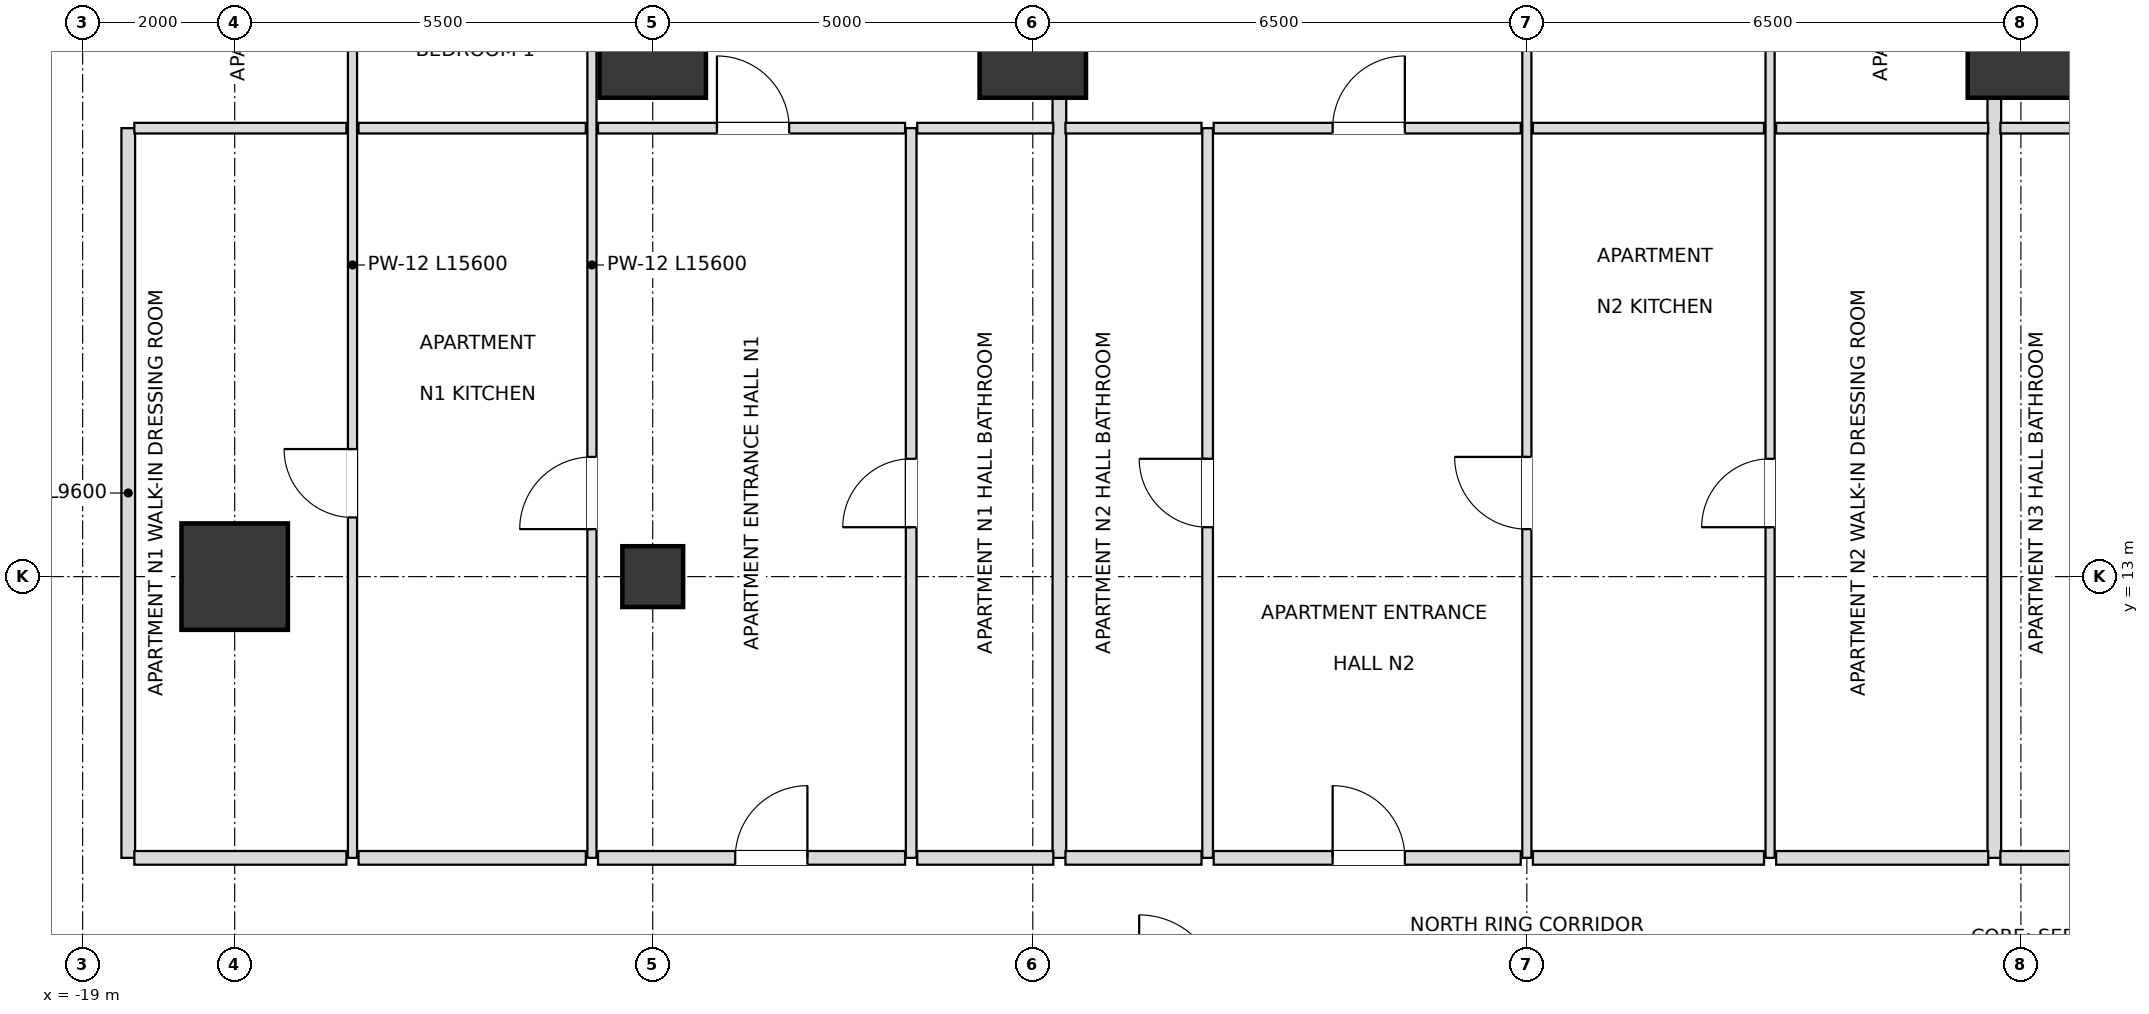
"""IFC4 building model, lengths in metres.
Left out: names, types, materials, properties, quantities, classifications, styles, units other than length and angle.
Written with IfcOpenShell. Run it as: python <this file> out.ifc"""

import sys

from ifc_helpers import new_model, si_unit, direction, frame, frame_2d, origin, origin_2d, place, context, subcontext, project, spatial, rectangle, extrude, element, fill, save


model = new_model("IFC4")
c1 = context("Model", 3, precision=1e-05, world=origin(), true_north=direction((0.0, 1.0)))
c2 = subcontext(c1, "Body", "Model", "MODEL_VIEW")
j1 = project(units=[si_unit("LENGTHUNIT", "METRE"), si_unit("PLANEANGLEUNIT", "RADIAN")], contexts=[c1])
p1 = place(None, origin())
s1 = spatial("IfcSite", under=j1, at=p1, CompositionType="ELEMENT")
p2 = place(p1, origin())
s2 = spatial("IfcBuilding", under=s1, at=p2, CompositionType="ELEMENT")
p3 = place(p2, frame((0.0, 0.0, 43.2)))
s3 = spatial("IfcBuildingStorey", under=s2, at=p3, CompositionType="ELEMENT", Elevation=43.2)
for number, where, z_axis, x_axis in (
    (1, (6.5, 20.0, 0.0), (0.0, 0.0, 1.0), (1.0, 0.0, 0.0)),
    (2, (-6.5, 20.0, 0.0), (0.0, 0.0, 1.0), (1.0, 0.0, 0.0)),
    (3, (-11.5, 20.0, 0.0), (0.0, 0.0, 1.0), (1.0, 0.0, 0.0)),
    (4, (-17.0, 13.0, 0.0), (0.0, 0.0, 1.0), (1.0, 0.0, 0.0)),
):
    element("IfcColumn", number, at=place(p3, frame(where, z_axis=z_axis, x_axis=x_axis)), inside=s3, PredefinedType="USERDEFINED", context=c2, shape_type="SweptSolid", body=[
        extrude(rectangle(XDim=1.4, YDim=1.4, at=origin_2d()), origin(), (0.0, 0.0, 1.0), 3.6),
    ])
p4 = place(p3, frame((-11.5, 13.0, 0.0), z_axis=(0.0, 0.0, 1.0), x_axis=(1.0, 0.0, 0.0)))
e5 = element("IfcColumn", 5, at=p4, inside=s3, PredefinedType="COLUMN", context=c2, shape_type="SweptSolid", body=[
    extrude(rectangle(XDim=0.8, YDim=0.8, at=origin_2d()), origin(), (0.0, 0.0, 1.0), 3.6),
])
p5 = place(p3, frame((-18.4, 9.3, 0.0), z_axis=(0.0, 0.0, 1.0), x_axis=(0.0, 1.0, 0.0)))
e6 = element("IfcWall", 6, at=p5, inside=s3, PredefinedType="PARTITIONING", context=c2, shape_type="SweptSolid", body=[
    extrude(rectangle(XDim=9.6, YDim=0.18, at=frame_2d((4.8, 0.0))), origin(), (0.0, 0.0, 1.0), 2.736),
])
p6 = place(p3, frame((-15.45, 9.3, 0.0), z_axis=(0.0, 0.0, 1.0), x_axis=(0.0, 1.0, 0.0)))
e7 = element("IfcWall", 7, at=p6, inside=s3, PredefinedType="PARTITIONING", context=c2, shape_type="SweptSolid", body=[
    extrude(rectangle(XDim=15.6, YDim=0.12, at=frame_2d((7.8, 0.0))), origin(), (0.0, 0.0, 1.0), 2.736),
])
p7 = place(p6, frame((4.478, 0.0, 0.0)))
e8 = element("IfcOpeningElement", 8, at=p7, cuts=e7, PredefinedType="OPENING", context=c2, shape_type="SweptSolid", body=[
    extrude(rectangle(XDim=0.9, YDim=2.1, at=frame_2d((0.45, 1.05))), frame((0.0, 0.07, 0.0), z_axis=(0.0, -1.0, 0.0), x_axis=(1.0, 0.0, 0.0)), (0.0, 0.0, 1.0), 0.14),
])
p8 = place(p6, frame((12.15, 0.0, 0.0)))
e9 = element("IfcOpeningElement", 9, at=p8, cuts=e7, PredefinedType="OPENING", context=c2, shape_type="SweptSolid", body=[
    extrude(rectangle(XDim=0.9, YDim=2.1, at=frame_2d((0.45, 1.05))), frame((0.0, 0.07, 0.0), z_axis=(0.0, -1.0, 0.0), x_axis=(1.0, 0.0, 0.0)), (0.0, 0.0, 1.0), 0.14),
])
p9 = place(p3, frame((-12.3, 9.3, 0.0), z_axis=(0.0, 0.0, 1.0), x_axis=(0.0, 1.0, 0.0)))
e10 = element("IfcWall", 10, at=p9, inside=s3, PredefinedType="PARTITIONING", context=c2, shape_type="SweptSolid", body=[
    extrude(rectangle(XDim=15.6, YDim=0.12, at=frame_2d((7.8, 0.0))), origin(), (0.0, 0.0, 1.0), 2.736),
])
p10 = place(p9, frame((4.325, 0.0, 0.0)))
e11 = element("IfcOpeningElement", 11, at=p10, cuts=e10, PredefinedType="OPENING", context=c2, shape_type="SweptSolid", body=[
    extrude(rectangle(XDim=0.95, YDim=2.1, at=frame_2d((0.475, 1.05))), frame((0.0, 0.07, 0.0), z_axis=(0.0, -1.0, 0.0), x_axis=(1.0, 0.0, 0.0)), (0.0, 0.0, 1.0), 0.14),
])
p11 = place(p9, frame((12.15, 0.0, 0.0)))
e12 = element("IfcOpeningElement", 12, at=p11, cuts=e10, PredefinedType="OPENING", context=c2, shape_type="SweptSolid", body=[
    extrude(rectangle(XDim=0.9, YDim=2.1, at=frame_2d((0.45, 1.05))), frame((0.0, 0.07, 0.0), z_axis=(0.0, -1.0, 0.0), x_axis=(1.0, 0.0, 0.0)), (0.0, 0.0, 1.0), 0.14),
])
p12 = place(p3, frame((-8.1, 9.3, 0.0), z_axis=(0.0, 0.0, 1.0), x_axis=(0.0, 1.0, 0.0)))
e13 = element("IfcWall", 13, at=p12, inside=s3, PredefinedType="PARTITIONING", context=c2, shape_type="SweptSolid", body=[
    extrude(rectangle(XDim=9.6, YDim=0.14, at=frame_2d((4.8, 0.0))), origin(), (0.0, 0.0, 1.0), 2.816),
])
p13 = place(p12, frame((4.35, 0.0, 0.0)))
e14 = element("IfcOpeningElement", 14, at=p13, cuts=e13, PredefinedType="OPENING", context=c2, shape_type="SweptSolid", body=[
    extrude(rectangle(XDim=0.9, YDim=2.1, at=frame_2d((0.45, 1.05))), frame((0.0, 0.08, 0.0), z_axis=(0.0, -1.0, 0.0), x_axis=(1.0, 0.0, 0.0)), (0.0, 0.0, 1.0), 0.16),
])
p14 = place(p3, frame((-6.15, 9.3, 0.0), z_axis=(0.0, 0.0, 1.0), x_axis=(0.0, 1.0, 0.0)))
e15 = element("IfcWall", 15, at=p14, inside=s3, PredefinedType="PARTITIONING", context=c2, shape_type="SweptSolid", body=[
    extrude(rectangle(XDim=15.6, YDim=0.18, at=frame_2d((7.8, 0.0))), origin(), (0.0, 0.0, 1.0), 2.816),
])
p15 = place(p3, frame((-4.2, 9.3, 0.0), z_axis=(0.0, 0.0, 1.0), x_axis=(0.0, 1.0, 0.0)))
e16 = element("IfcWall", 16, at=p15, inside=s3, PredefinedType="PARTITIONING", context=c2, shape_type="SweptSolid", body=[
    extrude(rectangle(XDim=9.6, YDim=0.14, at=frame_2d((4.8, 0.0))), origin(), (0.0, 0.0, 1.0), 2.948),
])
p16 = place(p15, frame((4.35, 0.0, 0.0)))
e17 = element("IfcOpeningElement", 17, at=p16, cuts=e16, PredefinedType="OPENING", context=c2, shape_type="SweptSolid", body=[
    extrude(rectangle(XDim=0.9, YDim=2.1, at=frame_2d((0.45, 1.05))), frame((0.0, 0.08, 0.0), z_axis=(0.0, -1.0, 0.0), x_axis=(1.0, 0.0, 0.0)), (0.0, 0.0, 1.0), 0.16),
])
p17 = place(p3, frame((0.0, 9.3, 0.0), z_axis=(0.0, 0.0, 1.0), x_axis=(0.0, 1.0, 0.0)))
e18 = element("IfcWall", 18, at=p17, inside=s3, PredefinedType="PARTITIONING", context=c2, shape_type="SweptSolid", body=[
    extrude(rectangle(XDim=15.6, YDim=0.12, at=frame_2d((7.8, 0.0))), origin(), (0.0, 0.0, 1.0), 2.816),
])
p18 = place(p17, frame((4.325, 0.0, 0.0)))
e19 = element("IfcOpeningElement", 19, at=p18, cuts=e18, PredefinedType="OPENING", context=c2, shape_type="SweptSolid", body=[
    extrude(rectangle(XDim=0.95, YDim=2.1, at=frame_2d((0.475, 1.05))), frame((0.0, 0.07, 0.0), z_axis=(0.0, -1.0, 0.0), x_axis=(1.0, 0.0, 0.0)), (0.0, 0.0, 1.0), 0.14),
])
p19 = place(p17, frame((12.15, 0.0, 0.0)))
e20 = element("IfcOpeningElement", 20, at=p19, cuts=e18, PredefinedType="OPENING", context=c2, shape_type="SweptSolid", body=[
    extrude(rectangle(XDim=0.9, YDim=2.1, at=frame_2d((0.45, 1.05))), frame((0.0, 0.07, 0.0), z_axis=(0.0, -1.0, 0.0), x_axis=(1.0, 0.0, 0.0)), (0.0, 0.0, 1.0), 0.14),
])
p20 = place(p3, frame((3.2, 9.3, 0.0), z_axis=(0.0, 0.0, 1.0), x_axis=(0.0, 1.0, 0.0)))
e21 = element("IfcWall", 21, at=p20, inside=s3, PredefinedType="PARTITIONING", context=c2, shape_type="SweptSolid", body=[
    extrude(rectangle(XDim=15.6, YDim=0.12, at=frame_2d((7.8, 0.0))), origin(), (0.0, 0.0, 1.0), 2.816),
])
p21 = place(p20, frame((4.35, 0.0, 0.0)))
e22 = element("IfcOpeningElement", 22, at=p21, cuts=e21, PredefinedType="OPENING", context=c2, shape_type="SweptSolid", body=[
    extrude(rectangle(XDim=0.9, YDim=2.1, at=frame_2d((0.45, 1.05))), frame((0.0, 0.07, 0.0), z_axis=(0.0, -1.0, 0.0), x_axis=(1.0, 0.0, 0.0)), (0.0, 0.0, 1.0), 0.14),
])
p22 = place(p20, frame((12.15, 0.0, 0.0)))
e23 = element("IfcOpeningElement", 23, at=p22, cuts=e21, PredefinedType="OPENING", context=c2, shape_type="SweptSolid", body=[
    extrude(rectangle(XDim=0.9, YDim=2.1, at=frame_2d((0.45, 1.05))), frame((0.0, 0.07, 0.0), z_axis=(0.0, -1.0, 0.0), x_axis=(1.0, 0.0, 0.0)), (0.0, 0.0, 1.0), 0.14),
])
p23 = place(p3, frame((6.15, 9.3, 0.0), z_axis=(0.0, 0.0, 1.0), x_axis=(0.0, 1.0, 0.0)))
e24 = element("IfcWall", 24, at=p23, inside=s3, PredefinedType="PARTITIONING", context=c2, shape_type="SweptSolid", body=[
    extrude(rectangle(XDim=15.6, YDim=0.18, at=frame_2d((7.8, 0.0))), origin(), (0.0, 0.0, 1.0), 2.816),
])
p24 = place(p3, frame((-18.32, 9.3, 0.0), z_axis=(0.0, 0.0, 1.0), x_axis=(1.0, 0.0, 0.0)))
e25 = element("IfcWall", 25, at=p24, inside=s3, PredefinedType="PARTITIONING", context=c2, shape_type="SweptSolid", body=[
    extrude(rectangle(XDim=2.79, YDim=0.18, at=frame_2d((1.395, 0.0))), origin(), (0.0, 0.0, 1.0), 2.816),
])
p25 = place(p3, frame((-15.37, 9.3, 0.0), z_axis=(0.0, 0.0, 1.0), x_axis=(1.0, 0.0, 0.0)))
e26 = element("IfcWall", 26, at=p25, inside=s3, PredefinedType="PARTITIONING", context=c2, shape_type="SweptSolid", body=[
    extrude(rectangle(XDim=2.99, YDim=0.18, at=frame_2d((1.495, 0.0))), origin(), (0.0, 0.0, 1.0), 3.38),
])
p26 = place(p3, frame((-12.22, 9.3, 0.0), z_axis=(0.0, 0.0, 1.0), x_axis=(1.0, 0.0, 0.0)))
e27 = element("IfcWall", 27, at=p26, inside=s3, PredefinedType="PARTITIONING", context=c2, shape_type="SweptSolid", body=[
    extrude(rectangle(XDim=4.04, YDim=0.18, at=frame_2d((2.02, 0.0))), origin(), (0.0, 0.0, 1.0), 3.38),
])
p27 = place(p26, frame((1.805, 0.0, 0.0)))
e28 = element("IfcOpeningElement", 28, at=p27, cuts=e27, PredefinedType="OPENING", context=c2, shape_type="SweptSolid", body=[
    extrude(rectangle(XDim=0.95, YDim=2.15, at=frame_2d((0.475, 1.075))), frame((0.0, 0.1, 0.0), z_axis=(0.0, -1.0, 0.0), x_axis=(1.0, 0.0, 0.0)), (0.0, 0.0, 1.0), 0.2),
])
p28 = place(p3, frame((-8.02, 9.3, 0.0), z_axis=(0.0, 0.0, 1.0), x_axis=(1.0, 0.0, 0.0)))
e29 = element("IfcWall", 29, at=p28, inside=s3, PredefinedType="PARTITIONING", context=c2, shape_type="SweptSolid", body=[
    extrude(rectangle(XDim=1.79, YDim=0.18, at=frame_2d((0.895, 0.0))), origin(), (0.0, 0.0, 1.0), 2.816),
])
p29 = place(p3, frame((-6.07, 9.3, 0.0), z_axis=(0.0, 0.0, 1.0), x_axis=(1.0, 0.0, 0.0)))
e30 = element("IfcWall", 30, at=p29, inside=s3, PredefinedType="PARTITIONING", context=c2, shape_type="SweptSolid", body=[
    extrude(rectangle(XDim=1.79, YDim=0.18, at=frame_2d((0.895, 0.0))), origin(), (0.0, 0.0, 1.0), 3.38),
])
p30 = place(p3, frame((-4.12, 9.3, 0.0), z_axis=(0.0, 0.0, 1.0), x_axis=(1.0, 0.0, 0.0)))
e31 = element("IfcWall", 31, at=p30, inside=s3, PredefinedType="PARTITIONING", context=c2, shape_type="SweptSolid", body=[
    extrude(rectangle(XDim=4.04, YDim=0.18, at=frame_2d((2.02, 0.0))), origin(), (0.0, 0.0, 1.0), 3.38),
])
p31 = place(p30, frame((1.565, 0.0, 0.0)))
e32 = element("IfcOpeningElement", 32, at=p31, cuts=e31, PredefinedType="OPENING", context=c2, shape_type="SweptSolid", body=[
    extrude(rectangle(XDim=0.95, YDim=2.15, at=frame_2d((0.475, 1.075))), frame((0.0, 0.1, 0.0), z_axis=(0.0, -1.0, 0.0), x_axis=(1.0, 0.0, 0.0)), (0.0, 0.0, 1.0), 0.2),
])
p32 = place(p3, frame((0.08, 9.3, 0.0), z_axis=(0.0, 0.0, 1.0), x_axis=(1.0, 0.0, 0.0)))
e33 = element("IfcWall", 33, at=p32, inside=s3, PredefinedType="PARTITIONING", context=c2, shape_type="SweptSolid", body=[
    extrude(rectangle(XDim=3.04, YDim=0.18, at=frame_2d((1.52, 0.0))), origin(), (0.0, 0.0, 1.0), 3.38),
])
p33 = place(p3, frame((3.28, 9.3, 0.0), z_axis=(0.0, 0.0, 1.0), x_axis=(1.0, 0.0, 0.0)))
e34 = element("IfcWall", 34, at=p33, inside=s3, PredefinedType="PARTITIONING", context=c2, shape_type="SweptSolid", body=[
    extrude(rectangle(XDim=2.79, YDim=0.18, at=frame_2d((1.395, 0.0))), origin(), (0.0, 0.0, 1.0), 3.38),
])
p34 = place(p3, frame((6.23, 9.3, 0.0), z_axis=(0.0, 0.0, 1.0), x_axis=(1.0, 0.0, 0.0)))
e35 = element("IfcWall", 35, at=p34, inside=s3, PredefinedType="PARTITIONING", context=c2, shape_type="SweptSolid", body=[
    extrude(rectangle(XDim=1.79, YDim=0.18, at=frame_2d((0.895, 0.0))), origin(), (0.0, 0.0, 1.0), 2.816),
])
p35 = place(p3, frame((-18.32, 18.9, 0.0), z_axis=(0.0, 0.0, 1.0), x_axis=(1.0, 0.0, 0.0)))
e36 = element("IfcWall", 36, at=p35, inside=s3, PredefinedType="PARTITIONING", context=c2, shape_type="SweptSolid", body=[
    extrude(rectangle(XDim=2.79, YDim=0.14, at=frame_2d((1.395, 0.0))), origin(), (0.0, 0.0, 1.0), 2.736),
])
p36 = place(p3, frame((-15.37, 18.9, 0.0), z_axis=(0.0, 0.0, 1.0), x_axis=(1.0, 0.0, 0.0)))
e37 = element("IfcWall", 37, at=p36, inside=s3, PredefinedType="PARTITIONING", context=c2, shape_type="SweptSolid", body=[
    extrude(rectangle(XDim=2.99, YDim=0.14, at=frame_2d((1.495, 0.0))), origin(), (0.0, 0.0, 1.0), 2.736),
])
p37 = place(p3, frame((-12.22, 18.9, 0.0), z_axis=(0.0, 0.0, 1.0), x_axis=(1.0, 0.0, 0.0)))
e38 = element("IfcWall", 38, at=p37, inside=s3, PredefinedType="PARTITIONING", context=c2, shape_type="SweptSolid", body=[
    extrude(rectangle(XDim=4.04, YDim=0.14, at=frame_2d((2.02, 0.0))), origin(), (0.0, 0.0, 1.0), 2.736),
])
p38 = place(p37, frame((1.565, 0.0, 0.0)))
e39 = element("IfcOpeningElement", 39, at=p38, cuts=e38, PredefinedType="OPENING", context=c2, shape_type="SweptSolid", body=[
    extrude(rectangle(XDim=0.95, YDim=2.1, at=frame_2d((0.475, 1.05))), frame((0.0, 0.08, 0.0), z_axis=(0.0, -1.0, 0.0), x_axis=(1.0, 0.0, 0.0)), (0.0, 0.0, 1.0), 0.16),
])
p39 = place(p3, frame((-8.02, 18.9, 0.0), z_axis=(0.0, 0.0, 1.0), x_axis=(1.0, 0.0, 0.0)))
e40 = element("IfcWall", 40, at=p39, inside=s3, PredefinedType="PARTITIONING", context=c2, shape_type="SweptSolid", body=[
    extrude(rectangle(XDim=1.79, YDim=0.14, at=frame_2d((0.895, 0.0))), origin(), (0.0, 0.0, 1.0), 2.816),
])
p40 = place(p3, frame((-6.07, 18.9, 0.0), z_axis=(0.0, 0.0, 1.0), x_axis=(1.0, 0.0, 0.0)))
e41 = element("IfcWall", 41, at=p40, inside=s3, PredefinedType="PARTITIONING", context=c2, shape_type="SweptSolid", body=[
    extrude(rectangle(XDim=1.79, YDim=0.14, at=frame_2d((0.895, 0.0))), origin(), (0.0, 0.0, 1.0), 3.38),
])
p41 = place(p3, frame((-4.12, 18.9, 0.0), z_axis=(0.0, 0.0, 1.0), x_axis=(1.0, 0.0, 0.0)))
e42 = element("IfcWall", 42, at=p41, inside=s3, PredefinedType="PARTITIONING", context=c2, shape_type="SweptSolid", body=[
    extrude(rectangle(XDim=4.04, YDim=0.14, at=frame_2d((2.02, 0.0))), origin(), (0.0, 0.0, 1.0), 3.38),
])
p42 = place(p41, frame((1.565, 0.0, 0.0)))
e43 = element("IfcOpeningElement", 43, at=p42, cuts=e42, PredefinedType="OPENING", context=c2, shape_type="SweptSolid", body=[
    extrude(rectangle(XDim=0.95, YDim=2.1, at=frame_2d((0.475, 1.05))), frame((0.0, 0.08, 0.0), z_axis=(0.0, -1.0, 0.0), x_axis=(1.0, 0.0, 0.0)), (0.0, 0.0, 1.0), 0.16),
])
p43 = place(p3, frame((0.08, 18.9, 0.0), z_axis=(0.0, 0.0, 1.0), x_axis=(1.0, 0.0, 0.0)))
e44 = element("IfcWall", 44, at=p43, inside=s3, PredefinedType="PARTITIONING", context=c2, shape_type="SweptSolid", body=[
    extrude(rectangle(XDim=3.04, YDim=0.14, at=frame_2d((1.52, 0.0))), origin(), (0.0, 0.0, 1.0), 3.38),
])
p44 = place(p3, frame((3.28, 18.9, 0.0), z_axis=(0.0, 0.0, 1.0), x_axis=(1.0, 0.0, 0.0)))
e45 = element("IfcWall", 45, at=p44, inside=s3, PredefinedType="PARTITIONING", context=c2, shape_type="SweptSolid", body=[
    extrude(rectangle(XDim=2.79, YDim=0.14, at=frame_2d((1.395, 0.0))), origin(), (0.0, 0.0, 1.0), 3.38),
])
p45 = place(p3, frame((6.23, 18.9, 0.0), z_axis=(0.0, 0.0, 1.0), x_axis=(1.0, 0.0, 0.0)))
e46 = element("IfcWall", 46, at=p45, inside=s3, PredefinedType="PARTITIONING", context=c2, shape_type="SweptSolid", body=[
    extrude(rectangle(XDim=1.79, YDim=0.14, at=frame_2d((0.895, 0.0))), origin(), (0.0, 0.0, 1.0), 2.816),
])
p46 = place(p13, origin())
e47 = element("IfcDoor", 47, at=p46, inside=s3, OperationType="SINGLE_SWING_LEFT", PredefinedType="DOOR", context=c2, shape_type="SweptSolid", body=[
    extrude(rectangle(XDim=0.9, YDim=2.1, at=frame_2d((0.45, 1.05))), frame((0.0, 0.025, 0.0), z_axis=(0.0, -1.0, 0.0), x_axis=(1.0, 0.0, 0.0)), (0.0, 0.0, 1.0), 0.05),
])
fill(e14, e47)
p47 = place(p27, origin())
e48 = element("IfcDoor", 48, at=p47, inside=s3, OperationType="SINGLE_SWING_RIGHT", PredefinedType="DOOR", context=c2, shape_type="SweptSolid", body=[
    extrude(rectangle(XDim=0.95, YDim=2.15, at=frame_2d((0.475, 1.075))), frame((0.0, 0.025, 0.0), z_axis=(0.0, -1.0, 0.0), x_axis=(1.0, 0.0, 0.0)), (0.0, 0.0, 1.0), 0.05),
])
fill(e28, e48)
p48 = place(p10, origin())
e49 = element("IfcDoor", 49, at=p48, inside=s3, OperationType="SINGLE_SWING_LEFT", PredefinedType="DOOR", context=c2, shape_type="SweptSolid", body=[
    extrude(rectangle(XDim=0.95, YDim=2.1, at=frame_2d((0.475, 1.05))), frame((0.0, 0.025, 0.0), z_axis=(0.0, -1.0, 0.0), x_axis=(1.0, 0.0, 0.0)), (0.0, 0.0, 1.0), 0.05),
])
fill(e11, e49)
p49 = place(p7, origin())
e50 = element("IfcDoor", 50, at=p49, inside=s3, OperationType="SINGLE_SWING_RIGHT", PredefinedType="DOOR", context=c2, shape_type="SweptSolid", body=[
    extrude(rectangle(XDim=0.9, YDim=2.1, at=frame_2d((0.45, 1.05))), frame((0.0, 0.025, 0.0), z_axis=(0.0, -1.0, 0.0), x_axis=(1.0, 0.0, 0.0)), (0.0, 0.0, 1.0), 0.05),
])
fill(e8, e50)
p50 = place(p38, origin())
e51 = element("IfcDoor", 51, at=p50, inside=s3, OperationType="SINGLE_SWING_LEFT", PredefinedType="DOOR", context=c2, shape_type="SweptSolid", body=[
    extrude(rectangle(XDim=0.95, YDim=2.1, at=frame_2d((0.475, 1.05))), frame((0.0, 0.025, 0.0), z_axis=(0.0, -1.0, 0.0), x_axis=(1.0, 0.0, 0.0)), (0.0, 0.0, 1.0), 0.05),
])
fill(e39, e51)
p51 = place(p16, origin())
e52 = element("IfcDoor", 52, at=p51, inside=s3, OperationType="SINGLE_SWING_RIGHT", PredefinedType="DOOR", context=c2, shape_type="SweptSolid", body=[
    extrude(rectangle(XDim=0.9, YDim=2.1, at=frame_2d((0.45, 1.05))), frame((0.0, 0.025, 0.0), z_axis=(0.0, -1.0, 0.0), x_axis=(1.0, 0.0, 0.0)), (0.0, 0.0, 1.0), 0.05),
])
fill(e17, e52)
p52 = place(p31, origin())
e53 = element("IfcDoor", 53, at=p52, inside=s3, OperationType="SINGLE_SWING_LEFT", PredefinedType="DOOR", context=c2, shape_type="SweptSolid", body=[
    extrude(rectangle(XDim=0.95, YDim=2.15, at=frame_2d((0.475, 1.075))), frame((0.0, 0.025, 0.0), z_axis=(0.0, -1.0, 0.0), x_axis=(1.0, 0.0, 0.0)), (0.0, 0.0, 1.0), 0.05),
])
fill(e32, e53)
p53 = place(p18, origin())
e54 = element("IfcDoor", 54, at=p53, inside=s3, OperationType="SINGLE_SWING_RIGHT", PredefinedType="DOOR", context=c2, shape_type="SweptSolid", body=[
    extrude(rectangle(XDim=0.95, YDim=2.1, at=frame_2d((0.475, 1.05))), frame((0.0, 0.025, 0.0), z_axis=(0.0, -1.0, 0.0), x_axis=(1.0, 0.0, 0.0)), (0.0, 0.0, 1.0), 0.05),
])
fill(e19, e54)
p54 = place(p21, origin())
e55 = element("IfcDoor", 55, at=p54, inside=s3, OperationType="SINGLE_SWING_LEFT", PredefinedType="DOOR", context=c2, shape_type="SweptSolid", body=[
    extrude(rectangle(XDim=0.9, YDim=2.1, at=frame_2d((0.45, 1.05))), frame((0.0, 0.025, 0.0), z_axis=(0.0, -1.0, 0.0), x_axis=(1.0, 0.0, 0.0)), (0.0, 0.0, 1.0), 0.05),
])
fill(e22, e55)
p55 = place(p42, origin())
e56 = element("IfcDoor", 56, at=p55, inside=s3, OperationType="SINGLE_SWING_RIGHT", PredefinedType="DOOR", context=c2, shape_type="SweptSolid", body=[
    extrude(rectangle(XDim=0.95, YDim=2.1, at=frame_2d((0.475, 1.05))), frame((0.0, 0.025, 0.0), z_axis=(0.0, -1.0, 0.0), x_axis=(1.0, 0.0, 0.0)), (0.0, 0.0, 1.0), 0.05),
])
fill(e43, e56)
save(model, sys.argv[1])
